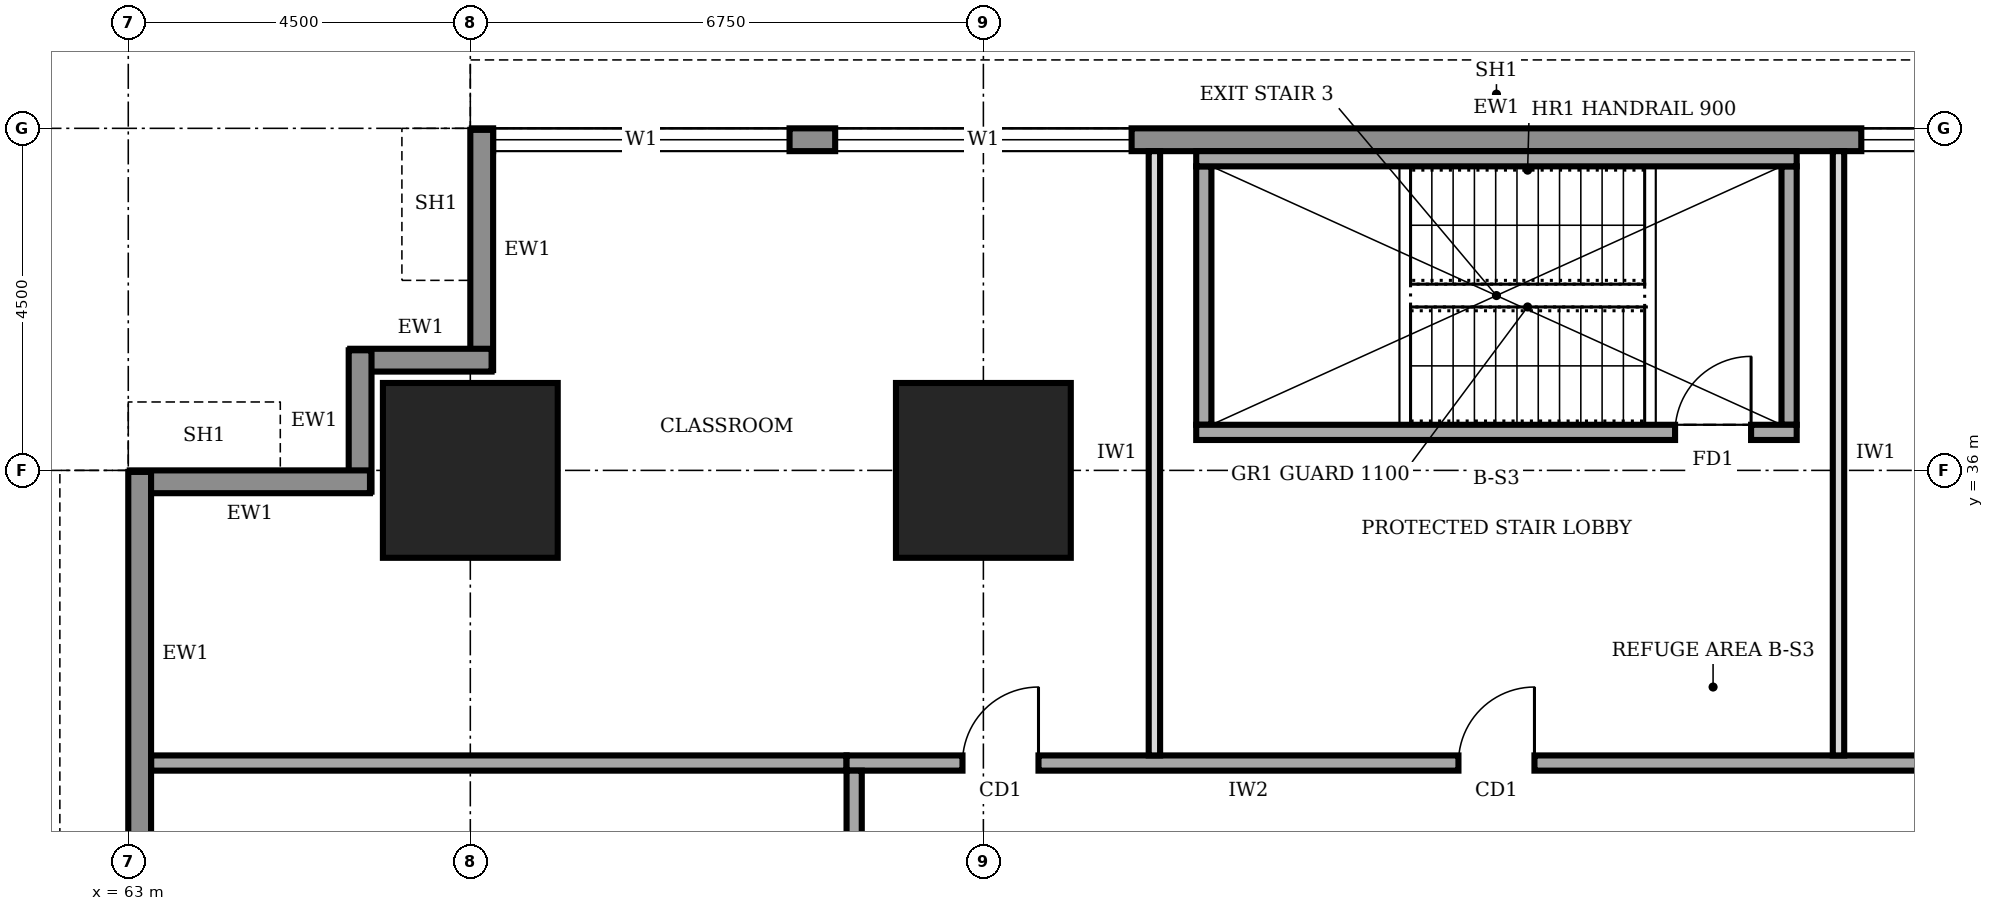
"""IFC4 building model, lengths in metres.
Left out: names, types, materials, properties, quantities, classifications, styles, units other than length and angle.
Written with IfcOpenShell. Run it as: python <this file> out.ifc"""

import sys

from ifc_helpers import new_model, si_unit, direction, frame, frame_2d, origin, origin_2d, place, context, subcontext, project, spatial, rectangle, extrude, element, fill, save


model = new_model("IFC4")
c1 = context("Model", 3, precision=1e-05, world=origin(), true_north=direction((0.0, 1.0)))
c2 = subcontext(c1, "Body", "Model", "MODEL_VIEW")
j1 = project(units=[si_unit("LENGTHUNIT", "METRE"), si_unit("PLANEANGLEUNIT", "RADIAN")], contexts=[c1])
p1 = place(None, origin())
s1 = spatial("IfcSite", under=j1, at=p1, CompositionType="ELEMENT")
p2 = place(p1, origin())
s2 = spatial("IfcBuilding", under=s1, at=p2, CompositionType="ELEMENT")
p3 = place(p2, frame((0.0, 0.0, 37.0)))
s3 = spatial("IfcBuildingStorey", under=s2, at=p3, CompositionType="ELEMENT", Elevation=37.0)
for number, where, z_axis, x_axis in (
    (1, (67.5, 36.0, 0.0), (0.0, 0.0, 1.0), (1.0, 0.0, 0.0)),
    (2, (74.25, 36.0, 0.0), (0.0, 0.0, 1.0), (1.0, 0.0, 0.0)),
):
    element("IfcColumn", number, at=place(p3, frame(where, z_axis=z_axis, x_axis=x_axis)), inside=s3, PredefinedType="COLUMN", context=c2, shape_type="SweptSolid", body=[
        extrude(rectangle(XDim=2.3, YDim=2.3, at=origin_2d()), origin(), (0.0, 0.0, 1.0), 4.0),
    ])
p4 = place(p3, frame((94.48, 40.35, 0.0), z_axis=(0.0, 0.0, 1.0), x_axis=(-1.0, 0.0, 0.0)))
e3 = element("IfcWall", 3, at=p4, inside=s3, PredefinedType="STANDARD", context=c2, shape_type="SweptSolid", body=[
    extrude(rectangle(XDim=26.96, YDim=0.3, at=frame_2d((13.48, 0.0))), origin(), (0.0, 0.0, 1.0), 3.75),
])
p5 = place(p4, frame((22.78, 0.0, 0.9)))
e4 = element("IfcOpeningElement", 4, at=p5, cuts=e3, PredefinedType="OPENING", context=c2, shape_type="SweptSolid", body=[
    extrude(rectangle(XDim=3.9, YDim=2.2, at=frame_2d((1.95, 1.1))), frame((0.0, 0.16, 0.0), z_axis=(0.0, -1.0, 0.0), x_axis=(1.0, 0.0, 0.0)), (0.0, 0.0, 1.0), 0.32),
])
p6 = place(p4, frame((18.28, 0.0, 0.9)))
e5 = element("IfcOpeningElement", 5, at=p6, cuts=e3, PredefinedType="OPENING", context=c2, shape_type="SweptSolid", body=[
    extrude(rectangle(XDim=3.9, YDim=2.2, at=frame_2d((1.95, 1.1))), frame((0.0, 0.16, 0.0), z_axis=(0.0, -1.0, 0.0), x_axis=(1.0, 0.0, 0.0)), (0.0, 0.0, 1.0), 0.32),
])
p7 = place(p4, frame((4.78, 0.0, 0.9)))
e6 = element("IfcOpeningElement", 6, at=p7, cuts=e3, PredefinedType="OPENING", context=c2, shape_type="SweptSolid", body=[
    extrude(rectangle(XDim=3.9, YDim=2.2, at=frame_2d((1.95, 1.1))), frame((0.0, 0.16, 0.0), z_axis=(0.0, -1.0, 0.0), x_axis=(1.0, 0.0, 0.0)), (0.0, 0.0, 1.0), 0.32),
])
p8 = place(p3, frame((67.65, 40.48, 0.0), z_axis=(0.0, 0.0, 1.0), x_axis=(0.0, -1.0, 0.0)))
e7 = element("IfcWall", 7, at=p8, inside=s3, PredefinedType="STANDARD", context=c2, shape_type="SweptSolid", body=[
    extrude(rectangle(XDim=3.16, YDim=0.3, at=frame_2d((1.58, 0.0))), origin(), (0.0, 0.0, 1.0), 2.85),
])
for number, where, z_axis, x_axis in (
    (8, (67.78, 37.45, 0.0), (0.0, 0.0, 1.0), (-1.0, 0.0, 0.0)),
    (9, (66.05, 37.58, 0.0), (0.0, 0.0, 1.0), (0.0, -1.0, 0.0)),
):
    element("IfcWall", number, at=place(p3, frame(where, z_axis=z_axis, x_axis=x_axis)), inside=s3, PredefinedType="STANDARD", context=c2, shape_type="SweptSolid", body=[
        extrude(rectangle(XDim=1.86, YDim=0.3, at=frame_2d((0.93, 0.0))), origin(), (0.0, 0.0, 1.0), 3.75),
    ])
p9 = place(p3, frame((66.18, 35.85, 0.0), z_axis=(0.0, 0.0, 1.0), x_axis=(-1.0, 0.0, 0.0)))
e10 = element("IfcWall", 10, at=p9, inside=s3, PredefinedType="STANDARD", context=c2, shape_type="SweptSolid", body=[
    extrude(rectangle(XDim=3.16, YDim=0.3, at=frame_2d((1.58, 0.0))), origin(), (0.0, 0.0, 1.0), 2.85),
])
p10 = place(p3, frame((63.15, 35.98, 0.0), z_axis=(0.0, 0.0, 1.0), x_axis=(0.0, -1.0, 0.0)))
e11 = element("IfcWall", 11, at=p10, inside=s3, PredefinedType="STANDARD", context=c2, shape_type="SweptSolid", body=[
    extrude(rectangle(XDim=31.46, YDim=0.3, at=frame_2d((15.73, 0.0))), origin(), (0.0, 0.0, 1.0), 3.75),
])
p11 = place(p10, frame((27.28, 0.0, 0.9)))
e12 = element("IfcOpeningElement", 12, at=p11, cuts=e11, PredefinedType="OPENING", context=c2, shape_type="SweptSolid", body=[
    extrude(rectangle(XDim=3.9, YDim=2.2, at=frame_2d((1.95, 1.1))), frame((0.0, 0.16, 0.0), z_axis=(0.0, -1.0, 0.0), x_axis=(1.0, 0.0, 0.0)), (0.0, 0.0, 1.0), 0.32),
])
p12 = place(p10, frame((22.78, 0.0, 0.9)))
e13 = element("IfcOpeningElement", 13, at=p12, cuts=e11, PredefinedType="OPENING", context=c2, shape_type="SweptSolid", body=[
    extrude(rectangle(XDim=3.9, YDim=2.2, at=frame_2d((1.95, 1.1))), frame((0.0, 0.16, 0.0), z_axis=(0.0, -1.0, 0.0), x_axis=(1.0, 0.0, 0.0)), (0.0, 0.0, 1.0), 0.32),
])
p13 = place(p10, frame((18.28, 0.0, 0.9)))
e14 = element("IfcOpeningElement", 14, at=p13, cuts=e11, PredefinedType="OPENING", context=c2, shape_type="SweptSolid", body=[
    extrude(rectangle(XDim=3.9, YDim=2.2, at=frame_2d((1.95, 1.1))), frame((0.0, 0.16, 0.0), z_axis=(0.0, -1.0, 0.0), x_axis=(1.0, 0.0, 0.0)), (0.0, 0.0, 1.0), 0.32),
])
p14 = place(p10, frame((13.78, 0.0, 0.9)))
e15 = element("IfcOpeningElement", 15, at=p14, cuts=e11, PredefinedType="OPENING", context=c2, shape_type="SweptSolid", body=[
    extrude(rectangle(XDim=3.9, YDim=2.2, at=frame_2d((1.95, 1.1))), frame((0.0, 0.16, 0.0), z_axis=(0.0, -1.0, 0.0), x_axis=(1.0, 0.0, 0.0)), (0.0, 0.0, 1.0), 0.32),
])
p15 = place(p10, frame((9.28, 0.0, 0.9)))
e16 = element("IfcOpeningElement", 16, at=p15, cuts=e11, PredefinedType="OPENING", context=c2, shape_type="SweptSolid", body=[
    extrude(rectangle(XDim=3.9, YDim=2.2, at=frame_2d((1.95, 1.1))), frame((0.0, 0.16, 0.0), z_axis=(0.0, -1.0, 0.0), x_axis=(1.0, 0.0, 0.0)), (0.0, 0.0, 1.0), 0.32),
])
p16 = place(p10, frame((4.78, 0.0, 0.9)))
e17 = element("IfcOpeningElement", 17, at=p16, cuts=e11, PredefinedType="OPENING", context=c2, shape_type="SweptSolid", body=[
    extrude(rectangle(XDim=3.9, YDim=2.2, at=frame_2d((1.95, 1.1))), frame((0.0, 0.16, 0.0), z_axis=(0.0, -1.0, 0.0), x_axis=(1.0, 0.0, 0.0)), (0.0, 0.0, 1.0), 0.32),
])
p17 = place(p3, frame((89.35, 32.15, 0.0), z_axis=(0.0, 0.0, 1.0), x_axis=(-1.0, 0.0, 0.0)))
e18 = element("IfcWall", 18, at=p17, inside=s3, PredefinedType="SOLIDWALL", context=c2, shape_type="SweptSolid", body=[
    extrude(rectangle(XDim=16.9, YDim=0.2, at=frame_2d((8.45, 0.0))), origin(), (0.0, 0.0, 1.0), 3.75),
])
p18 = place(p17, frame((14.375, 0.0, 0.0)))
e19 = element("IfcOpeningElement", 19, at=p18, cuts=e18, PredefinedType="OPENING", context=c2, shape_type="SweptSolid", body=[
    extrude(rectangle(XDim=1.0, YDim=2.1, at=frame_2d((0.5, 1.05))), frame((0.0, 0.11, 0.0), z_axis=(0.0, -1.0, 0.0), x_axis=(1.0, 0.0, 0.0)), (0.0, 0.0, 1.0), 0.22),
])
p19 = place(p17, frame((7.85, 0.0, 0.0)))
e20 = element("IfcOpeningElement", 20, at=p19, cuts=e18, PredefinedType="OPENING", context=c2, shape_type="SweptSolid", body=[
    extrude(rectangle(XDim=1.0, YDim=2.1, at=frame_2d((0.5, 1.05))), frame((0.0, 0.11, 0.0), z_axis=(0.0, -1.0, 0.0), x_axis=(1.0, 0.0, 0.0)), (0.0, 0.0, 1.0), 0.22),
])
p20 = place(p17, frame((1.325, 0.0, 0.0)))
e21 = element("IfcOpeningElement", 21, at=p20, cuts=e18, PredefinedType="OPENING", context=c2, shape_type="SweptSolid", body=[
    extrude(rectangle(XDim=1.0, YDim=2.1, at=frame_2d((0.5, 1.05))), frame((0.0, 0.11, 0.0), z_axis=(0.0, -1.0, 0.0), x_axis=(1.0, 0.0, 0.0)), (0.0, 0.0, 1.0), 0.22),
])
p21 = place(p3, frame((72.55, 32.05, 0.0), z_axis=(0.0, 0.0, 1.0), x_axis=(0.0, -1.0, 0.0)))
e22 = element("IfcWall", 22, at=p21, inside=s3, PredefinedType="SOLIDWALL", context=c2, shape_type="SweptSolid", body=[
    extrude(rectangle(XDim=23.8, YDim=0.2, at=frame_2d((11.9, 0.0))), origin(), (0.0, 0.0, 1.0), 3.75),
])
p22 = place(p21, frame((18.425, 0.0, 0.0)))
e23 = element("IfcOpeningElement", 23, at=p22, cuts=e22, PredefinedType="OPENING", context=c2, shape_type="SweptSolid", body=[
    extrude(rectangle(XDim=1.0, YDim=2.1, at=frame_2d((0.5, 1.05))), frame((0.0, 0.11, 0.0), z_axis=(0.0, -1.0, 0.0), x_axis=(1.0, 0.0, 0.0)), (0.0, 0.0, 1.0), 0.22),
])
p23 = place(p21, frame((6.225, 0.0, 0.0)))
e24 = element("IfcOpeningElement", 24, at=p23, cuts=e22, PredefinedType="OPENING", context=c2, shape_type="SweptSolid", body=[
    extrude(rectangle(XDim=1.4, YDim=2.1, at=frame_2d((0.7, 1.05))), frame((0.0, 0.11, 0.0), z_axis=(0.0, -1.0, 0.0), x_axis=(1.0, 0.0, 0.0)), (0.0, 0.0, 1.0), 0.22),
])
p24 = place(p3, frame((63.3, 32.15, 0.0), z_axis=(0.0, 0.0, 1.0), x_axis=(1.0, 0.0, 0.0)))
e25 = element("IfcWall", 25, at=p24, inside=s3, PredefinedType="SOLIDWALL", context=c2, shape_type="SweptSolid", body=[
    extrude(rectangle(XDim=9.15, YDim=0.2, at=frame_2d((4.575, 0.0))), origin(), (0.0, 0.0, 1.0), 3.75),
])
for number, where, z_axis, x_axis in (
    (26, (76.5, 32.25, 0.0), (0.0, 0.0, 1.0), (0.0, 1.0, 0.0)),
    (27, (85.5, 32.25, 0.0), (0.0, 0.0, 1.0), (0.0, 1.0, 0.0)),
):
    element("IfcWall", number, at=place(p3, frame(where, z_axis=z_axis, x_axis=x_axis)), inside=s3, PredefinedType="PARTITIONING", context=c2, shape_type="SweptSolid", body=[
        extrude(rectangle(XDim=7.95, YDim=0.15, at=frame_2d((3.975, 0.0))), origin(), (0.0, 0.0, 1.0), 3.75),
    ])
p25 = place(p3, frame((77.05, 36.5, 0.0), z_axis=(0.0, 0.0, 1.0), x_axis=(1.0, 0.0, 0.0)))
e28 = element("IfcWall", 28, at=p25, inside=s3, PredefinedType="SOLIDWALL", context=c2, shape_type="SweptSolid", body=[
    extrude(rectangle(XDim=7.9, YDim=0.2, at=frame_2d((3.95, 0.0))), origin(), (0.0, 0.0, 1.0), 3.75),
])
p26 = place(p25, frame((6.3, 0.0, 0.0)))
e29 = element("IfcOpeningElement", 29, at=p26, cuts=e28, PredefinedType="OPENING", context=c2, shape_type="SweptSolid", body=[
    extrude(rectangle(XDim=1.0, YDim=2.1, at=frame_2d((0.5, 1.05))), frame((0.0, 0.11, 0.0), z_axis=(0.0, -1.0, 0.0), x_axis=(1.0, 0.0, 0.0)), (0.0, 0.0, 1.0), 0.22),
])
p27 = place(p3, frame((77.05, 40.1, 0.0), z_axis=(0.0, 0.0, 1.0), x_axis=(1.0, 0.0, 0.0)))
e30 = element("IfcWall", 30, at=p27, inside=s3, PredefinedType="SOLIDWALL", context=c2, shape_type="SweptSolid", body=[
    extrude(rectangle(XDim=7.9, YDim=0.2, at=frame_2d((3.95, 0.0))), origin(), (0.0, 0.0, 1.0), 3.75),
])
for number, where, z_axis, x_axis in (
    (31, (77.15, 36.6, 0.0), (0.0, 0.0, 1.0), (0.0, 1.0, 0.0)),
    (32, (84.85, 36.6, 0.0), (0.0, 0.0, 1.0), (0.0, 1.0, 0.0)),
):
    element("IfcWall", number, at=place(p3, frame(where, z_axis=z_axis, x_axis=x_axis)), inside=s3, PredefinedType="SOLIDWALL", context=c2, shape_type="SweptSolid", body=[
        extrude(rectangle(XDim=3.4, YDim=0.2, at=frame_2d((1.7, 0.0))), origin(), (0.0, 0.0, 1.0), 3.75),
    ])
p28 = place(p5, origin())
e33 = element("IfcWindow", 33, at=p28, inside=s3, PartitioningType="SINGLE_PANEL", PredefinedType="WINDOW", context=c2, shape_type="SweptSolid", body=[
    extrude(rectangle(XDim=3.9, YDim=2.2, at=frame_2d((1.95, 1.1))), frame((0.0, 0.03, 0.0), z_axis=(0.0, -1.0, 0.0), x_axis=(1.0, 0.0, 0.0)), (0.0, 0.0, 1.0), 0.06),
])
fill(e4, e33)
p29 = place(p6, origin())
e34 = element("IfcWindow", 34, at=p29, inside=s3, PartitioningType="SINGLE_PANEL", PredefinedType="WINDOW", context=c2, shape_type="SweptSolid", body=[
    extrude(rectangle(XDim=3.9, YDim=2.2, at=frame_2d((1.95, 1.1))), frame((0.0, 0.03, 0.0), z_axis=(0.0, -1.0, 0.0), x_axis=(1.0, 0.0, 0.0)), (0.0, 0.0, 1.0), 0.06),
])
fill(e5, e34)
p30 = place(p7, origin())
e35 = element("IfcWindow", 35, at=p30, inside=s3, PartitioningType="SINGLE_PANEL", PredefinedType="WINDOW", context=c2, shape_type="SweptSolid", body=[
    extrude(rectangle(XDim=3.9, YDim=2.2, at=frame_2d((1.95, 1.1))), frame((0.0, 0.03, 0.0), z_axis=(0.0, -1.0, 0.0), x_axis=(1.0, 0.0, 0.0)), (0.0, 0.0, 1.0), 0.06),
])
fill(e6, e35)
p31 = place(p18, frame((1.0, 0.0, 0.0), z_axis=(0.0, 0.0, 1.0), x_axis=(-1.0, 0.0, 0.0)))
e36 = element("IfcDoor", 36, at=p31, inside=s3, OperationType="SINGLE_SWING_RIGHT", PredefinedType="DOOR", context=c2, shape_type="SweptSolid", body=[
    extrude(rectangle(XDim=1.0, YDim=2.1, at=frame_2d((0.5, 1.05))), frame((0.0, 0.025, 0.0), z_axis=(0.0, -1.0, 0.0), x_axis=(1.0, 0.0, 0.0)), (0.0, 0.0, 1.0), 0.05),
])
fill(e19, e36)
p32 = place(p19, frame((1.0, 0.0, 0.0), z_axis=(0.0, 0.0, 1.0), x_axis=(-1.0, 0.0, 0.0)))
e37 = element("IfcDoor", 37, at=p32, inside=s3, OperationType="SINGLE_SWING_RIGHT", PredefinedType="DOOR", context=c2, shape_type="SweptSolid", body=[
    extrude(rectangle(XDim=1.0, YDim=2.1, at=frame_2d((0.5, 1.05))), frame((0.0, 0.025, 0.0), z_axis=(0.0, -1.0, 0.0), x_axis=(1.0, 0.0, 0.0)), (0.0, 0.0, 1.0), 0.05),
])
fill(e20, e37)
p33 = place(p26, origin())
e38 = element("IfcDoor", 38, at=p33, inside=s3, OperationType="SINGLE_SWING_RIGHT", PredefinedType="DOOR", context=c2, shape_type="SweptSolid", body=[
    extrude(rectangle(XDim=1.0, YDim=2.1, at=frame_2d((0.5, 1.05))), frame((0.0, 0.025, 0.0), z_axis=(0.0, -1.0, 0.0), x_axis=(1.0, 0.0, 0.0)), (0.0, 0.0, 1.0), 0.05),
])
fill(e29, e38)
save(model, sys.argv[1])
